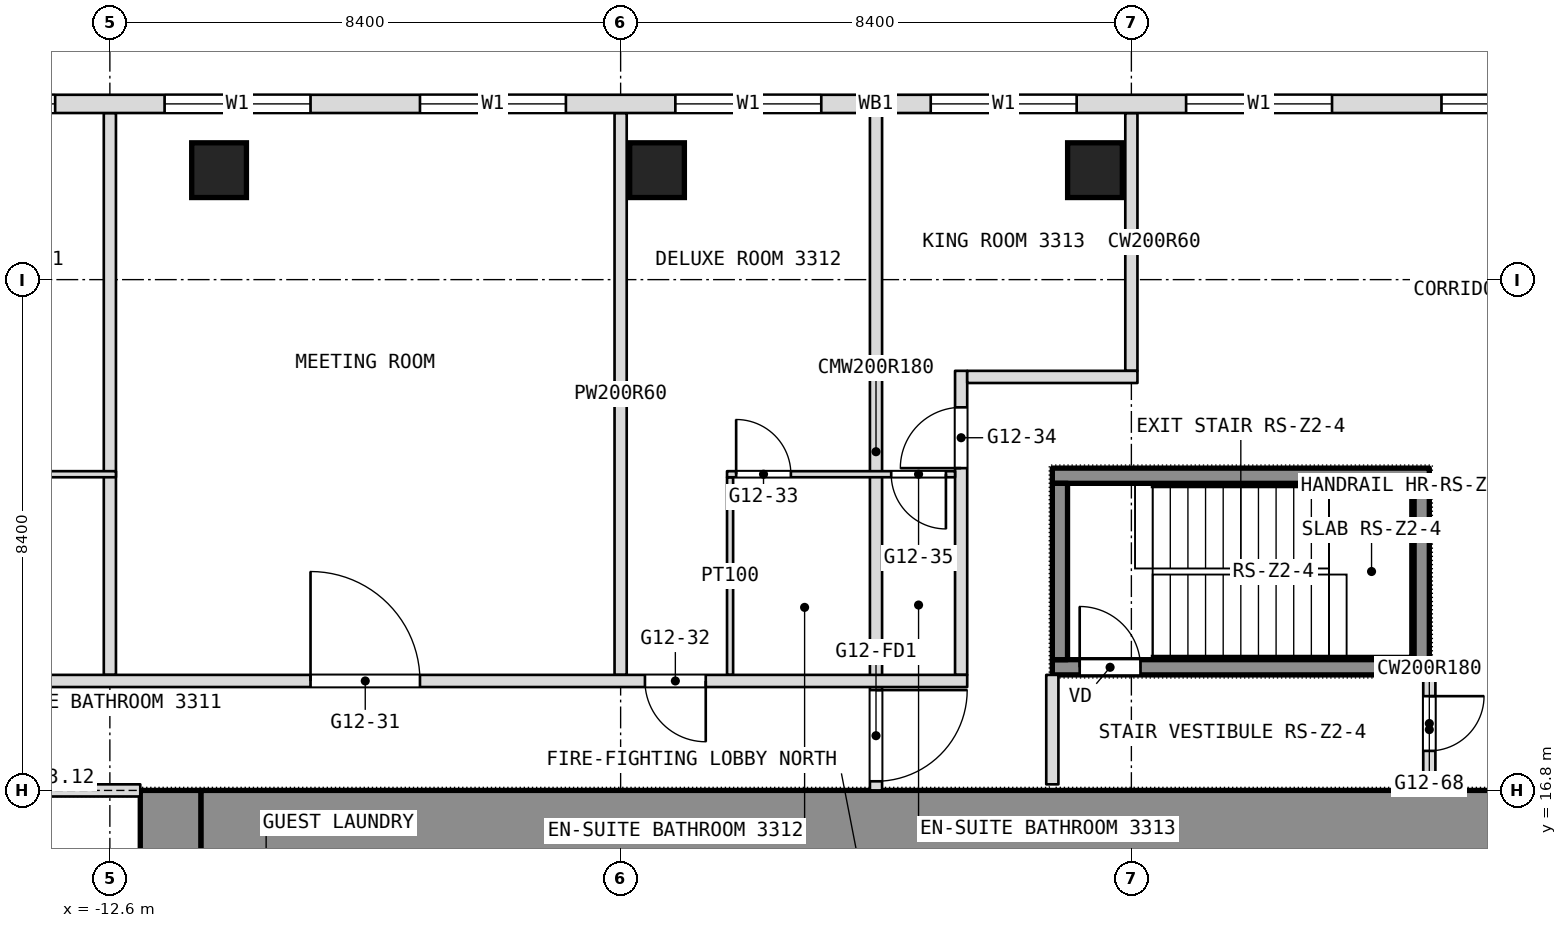
"""IFC4 building model, lengths in metres.
Left out: names, types, materials, properties, quantities, classifications, styles, units other than length and angle.
Written with IfcOpenShell. Run it as: python <this file> out.ifc"""

import sys

from ifc_helpers import new_model, si_unit, direction, frame, frame_2d, origin, origin_2d, place, context, subcontext, project, spatial, rectangle, extrude, element, fill, save


model = new_model("IFC4")
c1 = context("Model", 3, precision=1e-05, world=origin(), true_north=direction((0.0, 1.0)))
c2 = subcontext(c1, "Body", "Model", "MODEL_VIEW")
j1 = project(units=[si_unit("LENGTHUNIT", "METRE"), si_unit("PLANEANGLEUNIT", "RADIAN")], contexts=[c1])
p1 = place(None, origin())
s1 = spatial("IfcSite", under=j1, at=p1, CompositionType="ELEMENT")
p2 = place(p1, origin())
s2 = spatial("IfcBuilding", under=s1, at=p2, CompositionType="ELEMENT")
p3 = place(p2, frame((0.0, 0.0, 144.5)))
s3 = spatial("IfcBuildingStorey", under=s2, at=p3, CompositionType="ELEMENT", Elevation=144.5)
p4 = place(p3, frame((-11.6, 0.0, 0.0), z_axis=(0.0, 0.0, 1.0), x_axis=(0.0, 1.0, 0.0)))
e1 = element("IfcWall", 1, at=p4, inside=s3, PredefinedType="SHEAR", context=c2, shape_type="SweptSolid", body=[
    extrude(rectangle(XDim=16.8, YDim=1.0, at=frame_2d((8.4, 0.0))), origin(), (0.0, 0.0, 1.0), 3.6),
])
p5 = place(p4, frame((1.837, 0.0, 0.0)))
e2 = element("IfcOpeningElement", 2, at=p5, cuts=e1, PredefinedType="OPENING", context=c2, shape_type="SweptSolid", body=[
    extrude(rectangle(XDim=0.9, YDim=2.1, at=frame_2d((0.45, 1.05))), frame((0.0, 0.5, 0.0), z_axis=(0.0, -1.0, 0.0), x_axis=(1.0, 0.0, 0.0)), (0.0, 0.0, 1.0), 1.0),
])
p6 = place(p4, frame((4.462, 0.0, 0.0)))
e3 = element("IfcOpeningElement", 3, at=p6, cuts=e1, PredefinedType="OPENING", context=c2, shape_type="SweptSolid", body=[
    extrude(rectangle(XDim=0.9, YDim=2.1, at=frame_2d((0.45, 1.05))), frame((0.0, 0.5, 0.0), z_axis=(0.0, -1.0, 0.0), x_axis=(1.0, 0.0, 0.0)), (0.0, 0.0, 1.0), 1.0),
])
p7 = place(p4, frame((6.825, 0.0, 0.0)))
e4 = element("IfcOpeningElement", 4, at=p7, cuts=e1, PredefinedType="OPENING", context=c2, shape_type="SweptSolid", body=[
    extrude(rectangle(XDim=1.2, YDim=2.1, at=frame_2d((0.6, 1.05))), frame((0.0, 0.5, 0.0), z_axis=(0.0, -1.0, 0.0), x_axis=(1.0, 0.0, 0.0)), (0.0, 0.0, 1.0), 1.0),
])
p8 = place(p4, frame((12.3, 0.0, 0.0)))
e5 = element("IfcOpeningElement", 5, at=p8, cuts=e1, PredefinedType="OPENING", context=c2, shape_type="SweptSolid", body=[
    extrude(rectangle(XDim=0.9, YDim=2.1, at=frame_2d((0.45, 1.05))), frame((0.0, 0.5, 0.0), z_axis=(0.0, -1.0, 0.0), x_axis=(1.0, 0.0, 0.0)), (0.0, 0.0, 1.0), 1.0),
])
p9 = place(p4, frame((8.775, 0.0, 0.0)))
e6 = element("IfcOpeningElement", 6, at=p9, cuts=e1, PredefinedType="OPENING", context=c2, shape_type="SweptSolid", body=[
    extrude(rectangle(XDim=1.2, YDim=2.1, at=frame_2d((0.6, 1.05))), frame((0.0, 0.5, 0.0), z_axis=(0.0, -1.0, 0.0), x_axis=(1.0, 0.0, 0.0)), (0.0, 0.0, 1.0), 1.0),
])
p10 = place(p3, frame((-11.1, 16.3, 0.0), z_axis=(0.0, 0.0, 1.0), x_axis=(1.0, 0.0, 0.0)))
e7 = element("IfcWall", 7, at=p10, inside=s3, PredefinedType="SHEAR", context=c2, shape_type="SweptSolid", body=[
    extrude(rectangle(XDim=22.2, YDim=1.0, at=frame_2d((11.1, 0.0))), origin(), (0.0, 0.0, 1.0), 3.6),
])
for number, where, z_axis, x_axis in (
    (8, (-10.804, 27.0, 0.0), (0.0, 0.0, 1.0), (1.0, 0.0, 0.0)),
    (9, (-3.601, 27.0, 0.0), (0.0, 0.0, 1.0), (1.0, 0.0, 0.0)),
    (10, (3.601, 27.0, 0.0), (0.0, 0.0, 1.0), (1.0, 0.0, 0.0)),
):
    element("IfcColumn", number, at=place(p3, frame(where, z_axis=z_axis, x_axis=x_axis)), inside=s3, PredefinedType="COLUMN", context=c2, shape_type="SweptSolid", body=[
        extrude(rectangle(XDim=0.9, YDim=0.9, at=origin_2d()), origin(), (0.0, 0.0, 1.0), 3.6),
    ])
p11 = place(p3, frame((9.1, 16.9, 0.0), z_axis=(0.0, 0.0, 1.0), x_axis=(0.0, 1.0, 0.0)))
e11 = element("IfcWall", 11, at=p11, inside=s3, PredefinedType="PARTITIONING", context=c2, shape_type="SweptSolid", body=[
    extrude(rectangle(XDim=1.8, YDim=0.2, at=frame_2d((0.9, 0.0))), origin(), (0.0, 0.0, 1.0), 3.34),
])
p12 = place(p11, frame((0.55, 0.0, 0.0)))
e12 = element("IfcOpeningElement", 12, at=p12, cuts=e11, PredefinedType="OPENING", context=c2, shape_type="SweptSolid", body=[
    extrude(rectangle(XDim=0.9, YDim=2.1, at=frame_2d((0.45, 1.05))), frame((0.0, 0.1, 0.0), z_axis=(0.0, -1.0, 0.0), x_axis=(1.0, 0.0, 0.0)), (0.0, 0.0, 1.0), 0.2),
])
p13 = place(p3, frame((4.2, 23.7, 0.0), z_axis=(0.0, 0.0, 1.0), x_axis=(0.0, 1.0, 0.0)))
e13 = element("IfcWall", 13, at=p13, inside=s3, PredefinedType="PARTITIONING", context=c2, shape_type="SweptSolid", body=[
    extrude(rectangle(XDim=4.24, YDim=0.2, at=frame_2d((2.12, 0.0))), origin(), (0.0, 0.0, 1.0), 3.34),
])
p14 = place(p3, frame((2.9, 16.9, 0.0), z_axis=(0.0, 0.0, 1.0), x_axis=(0.0, 1.0, 0.0)))
e14 = element("IfcWall", 14, at=p14, inside=s3, PredefinedType="PARTITIONING", context=c2, shape_type="SweptSolid", body=[
    extrude(rectangle(XDim=1.8, YDim=0.2, at=frame_2d((0.9, 0.0))), origin(), (0.0, 0.0, 1.0), 3.34),
])
p15 = place(p3, frame((1.4, 18.7, 0.0), z_axis=(0.0, 0.0, 1.0), x_axis=(0.0, 1.0, 0.0)))
e15 = element("IfcWall", 15, at=p15, inside=s3, PredefinedType="PARTITIONING", context=c2, shape_type="SweptSolid", body=[
    extrude(rectangle(XDim=5.0, YDim=0.2, at=frame_2d((2.5, 0.0))), origin(), (0.0, 0.0, 1.0), 3.34),
])
p16 = place(p15, frame((3.4, 0.0, 0.0)))
e16 = element("IfcOpeningElement", 16, at=p16, cuts=e15, PredefinedType="OPENING", context=c2, shape_type="SweptSolid", body=[
    extrude(rectangle(XDim=1.0, YDim=2.1, at=frame_2d((0.5, 1.05))), frame((0.0, 0.1, 0.0), z_axis=(0.0, -1.0, 0.0), x_axis=(1.0, 0.0, 0.0)), (0.0, 0.0, 1.0), 0.2),
])
p17 = place(p3, frame((0.0, 16.8, 0.0), z_axis=(0.0, 0.0, 1.0), x_axis=(0.0, 1.0, 0.0)))
e17 = element("IfcWall", 17, at=p17, inside=s3, PredefinedType="PARTITIONING", context=c2, shape_type="SweptSolid", body=[
    extrude(rectangle(XDim=11.14, YDim=0.2, at=frame_2d((5.57, 0.0))), origin(), (0.0, 0.0, 1.0), 3.34),
])
p18 = place(p17, frame((0.15, 0.0, 0.0)))
e18 = element("IfcOpeningElement", 18, at=p18, cuts=e17, PredefinedType="OPENING", context=c2, shape_type="SweptSolid", body=[
    extrude(rectangle(XDim=1.5, YDim=2.1, at=frame_2d((0.75, 1.05))), frame((0.0, 0.1, 0.0), z_axis=(0.0, -1.0, 0.0), x_axis=(1.0, 0.0, 0.0)), (0.0, 0.0, 1.0), 0.2),
])
p19 = place(p3, frame((-2.4, 18.7, 0.0), z_axis=(0.0, 0.0, 1.0), x_axis=(0.0, 1.0, 0.0)))
e19 = element("IfcWall", 19, at=p19, inside=s3, PredefinedType="PARTITIONING", context=c2, shape_type="SweptSolid", body=[
    extrude(rectangle(XDim=3.25, YDim=0.1, at=frame_2d((1.625, 0.0))), origin(), (0.0, 0.0, 1.0), 3.34),
])
for number, where, z_axis, x_axis in (
    (20, (-4.2, 18.7, 0.0), (0.0, 0.0, 1.0), (0.0, 1.0, 0.0)),
    (21, (-12.6, 18.7, 0.0), (0.0, 0.0, 1.0), (0.0, 1.0, 0.0)),
):
    element("IfcWall", number, at=place(p3, frame(where, z_axis=z_axis, x_axis=x_axis)), inside=s3, PredefinedType="PARTITIONING", context=c2, shape_type="SweptSolid", body=[
        extrude(rectangle(XDim=9.24, YDim=0.2, at=frame_2d((4.62, 0.0))), origin(), (0.0, 0.0, 1.0), 3.34),
    ])
p20 = place(p3, frame((-16.9, 18.6, 0.0), z_axis=(0.0, 0.0, 1.0), x_axis=(1.0, 0.0, 0.0)))
e22 = element("IfcWall", 22, at=p20, inside=s3, PredefinedType="PARTITIONING", context=c2, shape_type="SweptSolid", body=[
    extrude(rectangle(XDim=18.4, YDim=0.2, at=frame_2d((9.2, 0.0))), origin(), (0.0, 0.0, 1.0), 3.34),
])
p21 = place(p20, frame((0.5, 0.0, 0.0)))
e23 = element("IfcOpeningElement", 23, at=p21, cuts=e22, PredefinedType="OPENING", context=c2, shape_type="SweptSolid", body=[
    extrude(rectangle(XDim=1.0, YDim=2.1, at=frame_2d((0.5, 1.05))), frame((0.0, 0.1, 0.0), z_axis=(0.0, -1.0, 0.0), x_axis=(1.0, 0.0, 0.0)), (0.0, 0.0, 1.0), 0.2),
])
p22 = place(p20, frame((7.6, 0.0, 0.0)))
e24 = element("IfcOpeningElement", 24, at=p22, cuts=e22, PredefinedType="OPENING", context=c2, shape_type="SweptSolid", body=[
    extrude(rectangle(XDim=1.8, YDim=2.1, at=frame_2d((0.9, 1.05))), frame((0.0, 0.1, 0.0), z_axis=(0.0, -1.0, 0.0), x_axis=(1.0, 0.0, 0.0)), (0.0, 0.0, 1.0), 0.2),
])
p23 = place(p20, frame((13.1, 0.0, 0.0)))
e25 = element("IfcOpeningElement", 25, at=p23, cuts=e22, PredefinedType="OPENING", context=c2, shape_type="SweptSolid", body=[
    extrude(rectangle(XDim=1.0, YDim=2.1, at=frame_2d((0.5, 1.05))), frame((0.0, 0.1, 0.0), z_axis=(0.0, -1.0, 0.0), x_axis=(1.0, 0.0, 0.0)), (0.0, 0.0, 1.0), 0.2),
])
p24 = place(p3, frame((-15.05, 22.0, 0.0), z_axis=(0.0, 0.0, 1.0), x_axis=(1.0, 0.0, 0.0)))
e26 = element("IfcWall", 26, at=p24, inside=s3, PredefinedType="PARTITIONING", context=c2, shape_type="SweptSolid", body=[
    extrude(rectangle(XDim=2.55, YDim=0.1, at=frame_2d((1.275, 0.0))), origin(), (0.0, 0.0, 1.0), 3.34),
])
p25 = place(p24, frame((0.15, 0.0, 0.0)))
e27 = element("IfcOpeningElement", 27, at=p25, cuts=e26, PredefinedType="OPENING", context=c2, shape_type="SweptSolid", body=[
    extrude(rectangle(XDim=0.9, YDim=2.1, at=frame_2d((0.45, 1.05))), frame((0.0, 0.05, 0.0), z_axis=(0.0, -1.0, 0.0), x_axis=(1.0, 0.0, 0.0)), (0.0, 0.0, 1.0), 0.1),
])
p26 = place(p3, frame((-2.45, 22.0, 0.0), z_axis=(0.0, 0.0, 1.0), x_axis=(1.0, 0.0, 0.0)))
e28 = element("IfcWall", 28, at=p26, inside=s3, PredefinedType="PARTITIONING", context=c2, shape_type="SweptSolid", body=[
    extrude(rectangle(XDim=3.75, YDim=0.1, at=frame_2d((1.875, 0.0))), origin(), (0.0, 0.0, 1.0), 3.34),
])
p27 = place(p26, frame((0.15, 0.0, 0.0)))
e29 = element("IfcOpeningElement", 29, at=p27, cuts=e28, PredefinedType="OPENING", context=c2, shape_type="SweptSolid", body=[
    extrude(rectangle(XDim=0.9, YDim=2.1, at=frame_2d((0.45, 1.05))), frame((0.0, 0.05, 0.0), z_axis=(0.0, -1.0, 0.0), x_axis=(1.0, 0.0, 0.0)), (0.0, 0.0, 1.0), 0.1),
])
p28 = place(p26, frame((2.7, 0.0, 0.0)))
e30 = element("IfcOpeningElement", 30, at=p28, cuts=e28, PredefinedType="OPENING", context=c2, shape_type="SweptSolid", body=[
    extrude(rectangle(XDim=0.9, YDim=2.1, at=frame_2d((0.45, 1.05))), frame((0.0, 0.05, 0.0), z_axis=(0.0, -1.0, 0.0), x_axis=(1.0, 0.0, 0.0)), (0.0, 0.0, 1.0), 0.1),
])
p29 = place(p3, frame((1.5, 23.6, 0.0), z_axis=(0.0, 0.0, 1.0), x_axis=(1.0, 0.0, 0.0)))
e31 = element("IfcWall", 31, at=p29, inside=s3, PredefinedType="PARTITIONING", context=c2, shape_type="SweptSolid", body=[
    extrude(rectangle(XDim=2.8, YDim=0.2, at=frame_2d((1.4, 0.0))), origin(), (0.0, 0.0, 1.0), 3.34),
])
p30 = place(p3, frame((21.306, 28.09, 0.0), z_axis=(0.0, 0.0, 1.0), x_axis=(-1.0, 0.0, 0.0)))
e32 = element("IfcWall", 32, at=p30, inside=s3, PredefinedType="NOTDEFINED", context=c2, shape_type="SweptSolid", body=[
    extrude(rectangle(XDim=42.612, YDim=0.3, at=frame_2d((21.306, 0.0))), origin(), (0.0, 0.0, 1.0), 3.6),
])
p31 = place(p30, frame((5.406, 0.0, 0.9)))
e33 = element("IfcOpeningElement", 33, at=p31, cuts=e32, PredefinedType="OPENING", context=c2, shape_type="SweptSolid", body=[
    extrude(rectangle(XDim=2.4, YDim=2.1, at=frame_2d((1.2, 1.05))), frame((0.0, 0.15, 0.0), z_axis=(0.0, -1.0, 0.0), x_axis=(1.0, 0.0, 0.0)), (0.0, 0.0, 1.0), 0.3),
])
p32 = place(p30, frame((9.606, 0.0, 0.9)))
e34 = element("IfcOpeningElement", 34, at=p32, cuts=e32, PredefinedType="OPENING", context=c2, shape_type="SweptSolid", body=[
    extrude(rectangle(XDim=2.4, YDim=2.1, at=frame_2d((1.2, 1.05))), frame((0.0, 0.15, 0.0), z_axis=(0.0, -1.0, 0.0), x_axis=(1.0, 0.0, 0.0)), (0.0, 0.0, 1.0), 0.3),
])
p33 = place(p30, frame((13.806, 0.0, 0.9)))
e35 = element("IfcOpeningElement", 35, at=p33, cuts=e32, PredefinedType="OPENING", context=c2, shape_type="SweptSolid", body=[
    extrude(rectangle(XDim=2.4, YDim=2.1, at=frame_2d((1.2, 1.05))), frame((0.0, 0.15, 0.0), z_axis=(0.0, -1.0, 0.0), x_axis=(1.0, 0.0, 0.0)), (0.0, 0.0, 1.0), 0.3),
])
p34 = place(p30, frame((18.006, 0.0, 0.9)))
e36 = element("IfcOpeningElement", 36, at=p34, cuts=e32, PredefinedType="OPENING", context=c2, shape_type="SweptSolid", body=[
    extrude(rectangle(XDim=2.4, YDim=2.1, at=frame_2d((1.2, 1.05))), frame((0.0, 0.15, 0.0), z_axis=(0.0, -1.0, 0.0), x_axis=(1.0, 0.0, 0.0)), (0.0, 0.0, 1.0), 0.3),
])
p35 = place(p30, frame((22.206, 0.0, 0.9)))
e37 = element("IfcOpeningElement", 37, at=p35, cuts=e32, PredefinedType="OPENING", context=c2, shape_type="SweptSolid", body=[
    extrude(rectangle(XDim=2.4, YDim=2.1, at=frame_2d((1.2, 1.05))), frame((0.0, 0.15, 0.0), z_axis=(0.0, -1.0, 0.0), x_axis=(1.0, 0.0, 0.0)), (0.0, 0.0, 1.0), 0.3),
])
p36 = place(p30, frame((26.406, 0.0, 0.9)))
e38 = element("IfcOpeningElement", 38, at=p36, cuts=e32, PredefinedType="OPENING", context=c2, shape_type="SweptSolid", body=[
    extrude(rectangle(XDim=2.4, YDim=2.1, at=frame_2d((1.2, 1.05))), frame((0.0, 0.15, 0.0), z_axis=(0.0, -1.0, 0.0), x_axis=(1.0, 0.0, 0.0)), (0.0, 0.0, 1.0), 0.3),
])
p37 = place(p30, frame((30.606, 0.0, 0.9)))
e39 = element("IfcOpeningElement", 39, at=p37, cuts=e32, PredefinedType="OPENING", context=c2, shape_type="SweptSolid", body=[
    extrude(rectangle(XDim=2.4, YDim=2.1, at=frame_2d((1.2, 1.05))), frame((0.0, 0.15, 0.0), z_axis=(0.0, -1.0, 0.0), x_axis=(1.0, 0.0, 0.0)), (0.0, 0.0, 1.0), 0.3),
])
p38 = place(p30, frame((34.806, 0.0, 0.9)))
e40 = element("IfcOpeningElement", 40, at=p38, cuts=e32, PredefinedType="OPENING", context=c2, shape_type="SweptSolid", body=[
    extrude(rectangle(XDim=2.4, YDim=2.1, at=frame_2d((1.2, 1.05))), frame((0.0, 0.15, 0.0), z_axis=(0.0, -1.0, 0.0), x_axis=(1.0, 0.0, 0.0)), (0.0, 0.0, 1.0), 0.3),
])
p39 = place(p3, frame((-16.7, 16.8, 0.0), z_axis=(0.0, 0.0, 1.0), x_axis=(1.0, 0.0, 0.0)))
e41 = element("IfcWall", 41, at=p39, inside=s3, PredefinedType="PARTITIONING", context=c2, shape_type="SweptSolid", body=[
    extrude(rectangle(XDim=4.6, YDim=0.2, at=frame_2d((2.3, 0.0))), origin(), (0.0, 0.0, 1.0), 2.89),
])
p40 = place(p3, frame((2.9, 18.825, 0.1), z_axis=(0.0, 0.0, 1.0), x_axis=(1.0, 0.0, 0.0)))
e42 = element("IfcWall", 42, at=p40, inside=s3, PredefinedType="SHEAR", context=c2, shape_type="SweptSolid", body=[
    extrude(rectangle(XDim=6.2, YDim=0.25, at=frame_2d((3.1, 0.0))), origin(), (0.0, 0.0, 1.0), 3.6),
])
p41 = place(p40, frame((0.45, 0.0, 0.0)))
e43 = element("IfcOpeningElement", 43, at=p41, cuts=e42, PredefinedType="OPENING", context=c2, shape_type="SweptSolid", body=[
    extrude(rectangle(XDim=1.0, YDim=2.1, at=frame_2d((0.5, 1.05))), frame((0.0, 0.125, 0.0), z_axis=(0.0, -1.0, 0.0), x_axis=(1.0, 0.0, 0.0)), (0.0, 0.0, 1.0), 0.25),
])
p42 = place(p3, frame((2.9, 21.975, 0.1), z_axis=(0.0, 0.0, 1.0), x_axis=(1.0, 0.0, 0.0)))
e44 = element("IfcWall", 44, at=p42, inside=s3, PredefinedType="SHEAR", context=c2, shape_type="SweptSolid", body=[
    extrude(rectangle(XDim=6.2, YDim=0.25, at=frame_2d((3.1, 0.0))), origin(), (0.0, 0.0, 1.0), 3.6),
])
for number, where, z_axis, x_axis in (
    (45, (3.025, 18.95, 0.1), (0.0, 0.0, 1.0), (0.0, 1.0, 0.0)),
    (46, (8.975, 18.95, 0.1), (0.0, 0.0, 1.0), (0.0, 1.0, 0.0)),
):
    element("IfcWall", number, at=place(p3, frame(where, z_axis=z_axis, x_axis=x_axis)), inside=s3, PredefinedType="SHEAR", context=c2, shape_type="SweptSolid", body=[
        extrude(rectangle(XDim=2.9, YDim=0.25, at=frame_2d((1.45, 0.0))), origin(), (0.0, 0.0, 1.0), 3.6),
    ])
p43 = place(p12, origin())
e47 = element("IfcDoor", 47, at=p43, inside=s3, OperationType="SINGLE_SWING_RIGHT", PredefinedType="DOOR", context=c2, shape_type="SweptSolid", body=[
    extrude(rectangle(XDim=0.9, YDim=2.1, at=frame_2d((0.45, 1.05))), frame((0.0, 0.025, 0.0), z_axis=(0.0, -1.0, 0.0), x_axis=(1.0, 0.0, 0.0)), (0.0, 0.0, 1.0), 0.05),
])
fill(e12, e47)
p44 = place(p16, origin())
e48 = element("IfcDoor", 48, at=p44, inside=s3, OperationType="SINGLE_SWING_RIGHT", PredefinedType="DOOR", context=c2, shape_type="SweptSolid", body=[
    extrude(rectangle(XDim=1.0, YDim=2.1, at=frame_2d((0.5, 1.05))), frame((0.0, 0.025, 0.0), z_axis=(0.0, -1.0, 0.0), x_axis=(1.0, 0.0, 0.0)), (0.0, 0.0, 1.0), 0.05),
])
fill(e16, e48)
p45 = place(p22, origin())
e49 = element("IfcDoor", 49, at=p45, inside=s3, OperationType="DOUBLE_DOOR_SINGLE_SWING", PredefinedType="DOOR", context=c2, shape_type="SweptSolid", body=[
    extrude(rectangle(XDim=1.8, YDim=2.1, at=frame_2d((0.9, 1.05))), frame((0.0, 0.025, 0.0), z_axis=(0.0, -1.0, 0.0), x_axis=(1.0, 0.0, 0.0)), (0.0, 0.0, 1.0), 0.05),
])
fill(e24, e49)
p46 = place(p23, origin())
e50 = element("IfcDoor", 50, at=p46, inside=s3, OperationType="SINGLE_SWING_LEFT", PredefinedType="DOOR", context=c2, shape_type="SweptSolid", body=[
    extrude(rectangle(XDim=1.0, YDim=2.1, at=frame_2d((0.5, 1.05))), frame((0.0, 0.025, 0.0), z_axis=(0.0, -1.0, 0.0), x_axis=(1.0, 0.0, 0.0)), (0.0, 0.0, 1.0), 0.05),
])
fill(e25, e50)
p47 = place(p27, origin())
e51 = element("IfcDoor", 51, at=p47, inside=s3, OperationType="SINGLE_SWING_RIGHT", PredefinedType="DOOR", context=c2, shape_type="SweptSolid", body=[
    extrude(rectangle(XDim=0.9, YDim=2.1, at=frame_2d((0.45, 1.05))), frame((0.0, 0.025, 0.0), z_axis=(0.0, -1.0, 0.0), x_axis=(1.0, 0.0, 0.0)), (0.0, 0.0, 1.0), 0.05),
])
fill(e29, e51)
p48 = place(p28, origin())
e52 = element("IfcDoor", 52, at=p48, inside=s3, OperationType="SINGLE_SWING_LEFT", PredefinedType="DOOR", context=c2, shape_type="SweptSolid", body=[
    extrude(rectangle(XDim=0.9, YDim=2.1, at=frame_2d((0.45, 1.05))), frame((0.0, 0.025, 0.0), z_axis=(0.0, -1.0, 0.0), x_axis=(1.0, 0.0, 0.0)), (0.0, 0.0, 1.0), 0.05),
])
fill(e30, e52)
p49 = place(p32, origin())
e53 = element("IfcWindow", 53, at=p49, inside=s3, PartitioningType="SINGLE_PANEL", PredefinedType="WINDOW", context=c2, shape_type="SweptSolid", body=[
    extrude(rectangle(XDim=2.4, YDim=2.1, at=frame_2d((1.2, 1.05))), frame((0.0, 0.03, 0.0), z_axis=(0.0, -1.0, 0.0), x_axis=(1.0, 0.0, 0.0)), (0.0, 0.0, 1.0), 0.06),
])
fill(e34, e53)
p50 = place(p33, origin())
e54 = element("IfcWindow", 54, at=p50, inside=s3, PartitioningType="SINGLE_PANEL", PredefinedType="WINDOW", context=c2, shape_type="SweptSolid", body=[
    extrude(rectangle(XDim=2.4, YDim=2.1, at=frame_2d((1.2, 1.05))), frame((0.0, 0.03, 0.0), z_axis=(0.0, -1.0, 0.0), x_axis=(1.0, 0.0, 0.0)), (0.0, 0.0, 1.0), 0.06),
])
fill(e35, e54)
p51 = place(p34, origin())
e55 = element("IfcWindow", 55, at=p51, inside=s3, PartitioningType="SINGLE_PANEL", PredefinedType="WINDOW", context=c2, shape_type="SweptSolid", body=[
    extrude(rectangle(XDim=2.4, YDim=2.1, at=frame_2d((1.2, 1.05))), frame((0.0, 0.03, 0.0), z_axis=(0.0, -1.0, 0.0), x_axis=(1.0, 0.0, 0.0)), (0.0, 0.0, 1.0), 0.06),
])
fill(e36, e55)
p52 = place(p35, origin())
e56 = element("IfcWindow", 56, at=p52, inside=s3, PartitioningType="SINGLE_PANEL", PredefinedType="WINDOW", context=c2, shape_type="SweptSolid", body=[
    extrude(rectangle(XDim=2.4, YDim=2.1, at=frame_2d((1.2, 1.05))), frame((0.0, 0.03, 0.0), z_axis=(0.0, -1.0, 0.0), x_axis=(1.0, 0.0, 0.0)), (0.0, 0.0, 1.0), 0.06),
])
fill(e37, e56)
p53 = place(p36, origin())
e57 = element("IfcWindow", 57, at=p53, inside=s3, PartitioningType="SINGLE_PANEL", PredefinedType="WINDOW", context=c2, shape_type="SweptSolid", body=[
    extrude(rectangle(XDim=2.4, YDim=2.1, at=frame_2d((1.2, 1.05))), frame((0.0, 0.03, 0.0), z_axis=(0.0, -1.0, 0.0), x_axis=(1.0, 0.0, 0.0)), (0.0, 0.0, 1.0), 0.06),
])
fill(e38, e57)
p54 = place(p37, origin())
e58 = element("IfcWindow", 58, at=p54, inside=s3, PartitioningType="SINGLE_PANEL", PredefinedType="WINDOW", context=c2, shape_type="SweptSolid", body=[
    extrude(rectangle(XDim=2.4, YDim=2.1, at=frame_2d((1.2, 1.05))), frame((0.0, 0.03, 0.0), z_axis=(0.0, -1.0, 0.0), x_axis=(1.0, 0.0, 0.0)), (0.0, 0.0, 1.0), 0.06),
])
fill(e39, e58)
p55 = place(p38, origin())
e59 = element("IfcWindow", 59, at=p55, inside=s3, PartitioningType="SINGLE_PANEL", PredefinedType="WINDOW", context=c2, shape_type="SweptSolid", body=[
    extrude(rectangle(XDim=2.4, YDim=2.1, at=frame_2d((1.2, 1.05))), frame((0.0, 0.03, 0.0), z_axis=(0.0, -1.0, 0.0), x_axis=(1.0, 0.0, 0.0)), (0.0, 0.0, 1.0), 0.06),
])
fill(e40, e59)
p56 = place(p41, origin())
e60 = element("IfcDoor", 60, at=p56, inside=s3, OperationType="SINGLE_SWING_LEFT", PredefinedType="DOOR", context=c2, shape_type="SweptSolid", body=[
    extrude(rectangle(XDim=1.0, YDim=2.1, at=frame_2d((0.5, 1.05))), frame((0.0, 0.025, 0.0), z_axis=(0.0, -1.0, 0.0), x_axis=(1.0, 0.0, 0.0)), (0.0, 0.0, 1.0), 0.05),
])
fill(e43, e60)
p57 = place(p18, origin())
e61 = element("IfcDoor", 61, at=p57, inside=s3, OperationType="DOUBLE_DOOR_DOUBLE_SWING", PredefinedType="DOOR", context=c2, shape_type="SweptSolid", body=[
    extrude(rectangle(XDim=1.5, YDim=2.1, at=frame_2d((0.75, 1.05))), frame((0.0, 0.025, 0.0), z_axis=(0.0, -1.0, 0.0), x_axis=(1.0, 0.0, 0.0)), (0.0, 0.0, 1.0), 0.05),
])
fill(e18, e61)
save(model, sys.argv[1])
